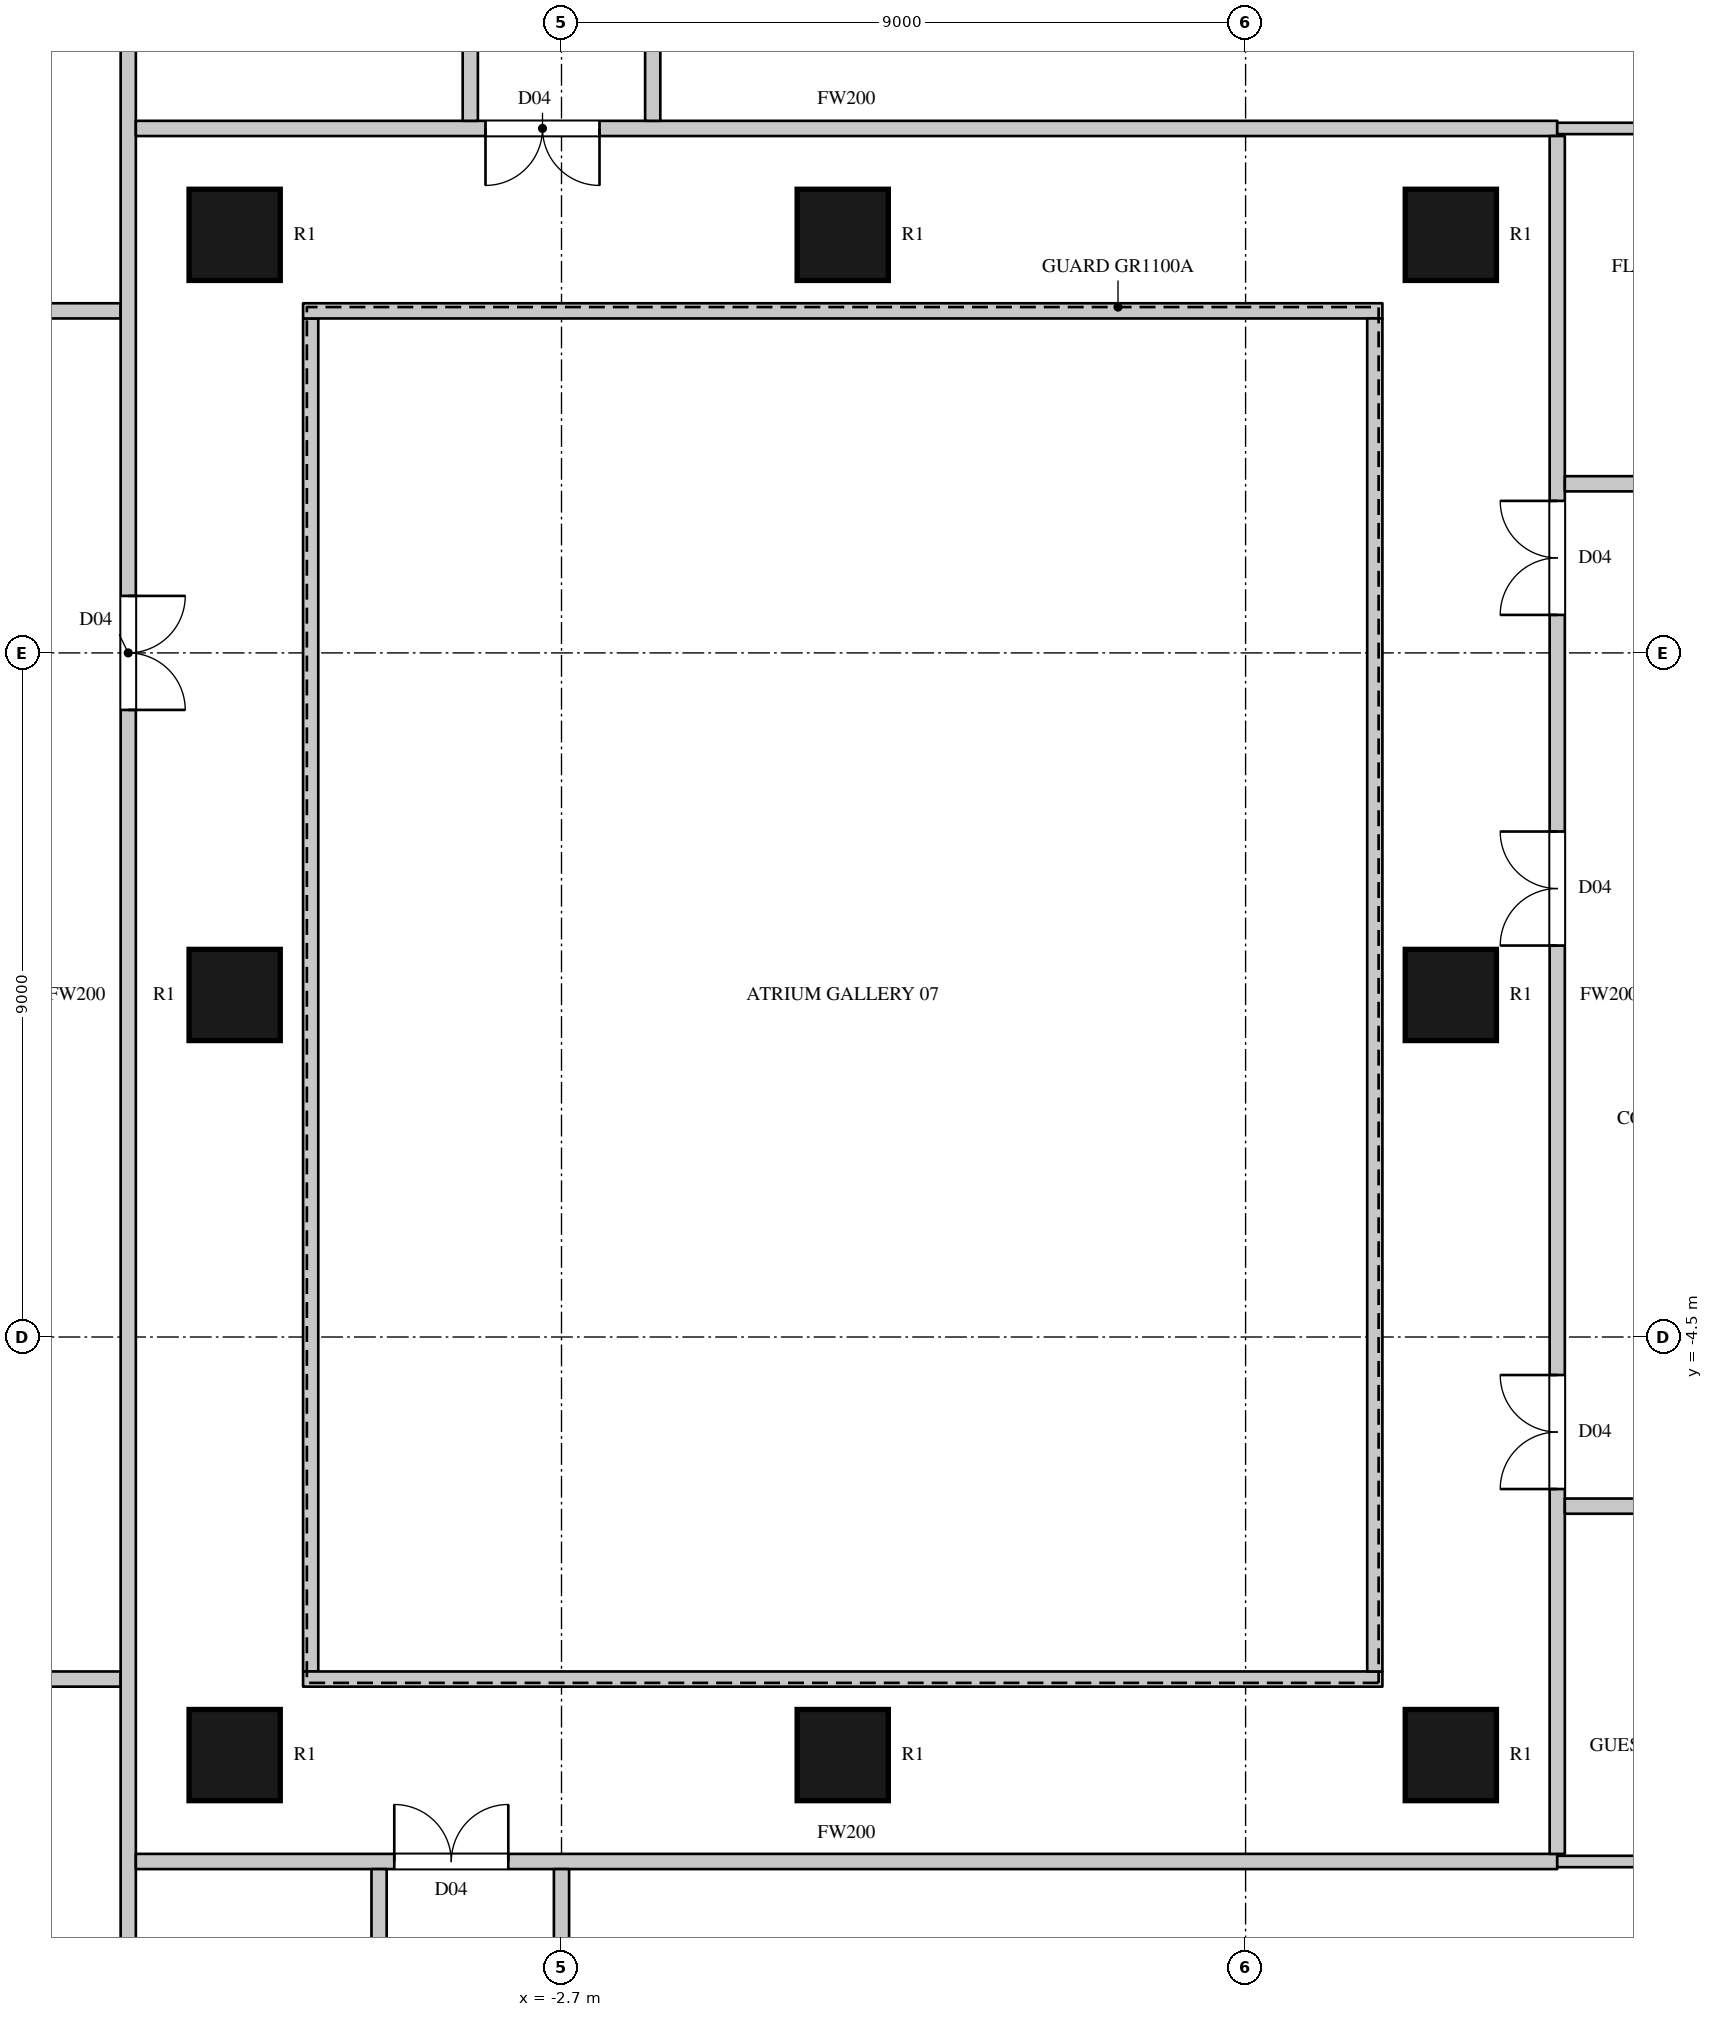
"""IFC4 building model, lengths in metres.
Left out: names, types, materials, properties, quantities, classifications, styles, units other than length and angle.
Written with IfcOpenShell. Run it as: python <this file> out.ifc"""

import sys

from ifc_helpers import new_model, si_unit, direction, frame, frame_2d, origin, origin_2d, place, context, subcontext, project, spatial, rectangle, circle, extrude, element, fill, save


model = new_model("IFC4")
c1 = context("Model", 3, precision=1e-05, world=origin(), true_north=direction((0.0, 1.0)))
c2 = subcontext(c1, "Body", "Model", "MODEL_VIEW")
j1 = project(units=[si_unit("LENGTHUNIT", "METRE"), si_unit("PLANEANGLEUNIT", "RADIAN")], contexts=[c1])
p1 = place(None, origin())
s1 = spatial("IfcSite", under=j1, at=p1, CompositionType="ELEMENT")
p2 = place(p1, origin())
s2 = spatial("IfcBuilding", under=s1, at=p2, CompositionType="ELEMENT")
p3 = place(p2, frame((0.0, 0.0, 55.5)))
s3 = spatial("IfcBuildingStorey", under=s2, at=p3, CompositionType="ELEMENT", Elevation=55.5)
for number, where, z_axis, x_axis in (
    (1, (-7.0, -10.0, 0.0), (0.0, 0.0, 1.0), (1.0, 0.0, 0.0)),
    (2, (-7.0, 0.0, 0.0), (0.0, 0.0, 1.0), (1.0, 0.0, 0.0)),
    (3, (-7.0, 10.0, 0.0), (0.0, 0.0, 1.0), (1.0, 0.0, 0.0)),
    (4, (1.0, -10.0, 0.0), (0.0, 0.0, 1.0), (1.0, 0.0, 0.0)),
    (5, (1.0, 10.0, 0.0), (0.0, 0.0, 1.0), (1.0, 0.0, 0.0)),
    (6, (9.0, -10.0, 0.0), (0.0, 0.0, 1.0), (1.0, 0.0, 0.0)),
    (7, (9.0, 0.0, 0.0), (0.0, 0.0, 1.0), (1.0, 0.0, 0.0)),
    (8, (9.0, 10.0, 0.0), (0.0, 0.0, 1.0), (1.0, 0.0, 0.0)),
):
    element("IfcColumn", number, at=place(p3, frame(where, z_axis=z_axis, x_axis=x_axis)), inside=s3, PredefinedType="COLUMN", context=c2, shape_type="SweptSolid", body=[
        extrude(circle(Radius=0.6, at=origin_2d()), origin(), (0.0, 0.0, 1.0), 3.6),
    ])
p4 = place(p3, frame((-13.97, -9.0, 0.0), z_axis=(0.0, 0.0, 1.0), x_axis=(1.0, 0.0, 0.0)))
e9 = element("IfcWall", 9, at=p4, inside=s3, PredefinedType="PARTITIONING", context=c2, shape_type="SweptSolid", body=[
    extrude(rectangle(XDim=5.47, YDim=0.2, at=frame_2d((2.735, 0.0))), origin(), (0.0, 0.0, 1.0), 3.3),
])
p5 = place(p4, frame((0.4, 0.0, 0.0)))
e10 = element("IfcOpeningElement", 10, at=p5, cuts=e9, PredefinedType="OPENING", context=c2, shape_type="SweptSolid", body=[
    extrude(rectangle(XDim=1.5, YDim=2.2, at=frame_2d((0.75, 1.1))), frame((0.0, 0.11, 0.0), z_axis=(0.0, -1.0, 0.0), x_axis=(1.0, 0.0, 0.0)), (0.0, 0.0, 1.0), 0.22),
])
p6 = place(p4, frame((2.05, 0.0, 0.0)))
e11 = element("IfcOpeningElement", 11, at=p6, cuts=e9, PredefinedType="OPENING", context=c2, shape_type="SweptSolid", body=[
    extrude(rectangle(XDim=1.5, YDim=2.2, at=frame_2d((0.75, 1.1))), frame((0.0, 0.11, 0.0), z_axis=(0.0, -1.0, 0.0), x_axis=(1.0, 0.0, 0.0)), (0.0, 0.0, 1.0), 0.22),
])
p7 = place(p3, frame((-13.97, 9.0, 0.0), z_axis=(0.0, 0.0, 1.0), x_axis=(1.0, 0.0, 0.0)))
e12 = element("IfcWall", 12, at=p7, inside=s3, PredefinedType="PARTITIONING", context=c2, shape_type="SweptSolid", body=[
    extrude(rectangle(XDim=5.47, YDim=0.2, at=frame_2d((2.735, 0.0))), origin(), (0.0, 0.0, 1.0), 3.3),
])
p8 = place(p3, frame((-8.4, -15.3, 0.0), z_axis=(0.0, 0.0, 1.0), x_axis=(0.0, 1.0, 0.0)))
e13 = element("IfcWall", 13, at=p8, inside=s3, PredefinedType="PARTITIONING", context=c2, shape_type="SweptSolid", body=[
    extrude(rectangle(XDim=30.6, YDim=0.2, at=frame_2d((15.3, 0.0))), origin(), (0.0, 0.0, 1.0), 3.3),
])
p9 = place(p8, frame((19.05, 0.0, 0.0)))
e14 = element("IfcOpeningElement", 14, at=p9, cuts=e13, PredefinedType="OPENING", context=c2, shape_type="SweptSolid", body=[
    extrude(rectangle(XDim=1.5, YDim=2.2, at=frame_2d((0.75, 1.1))), frame((0.0, 0.11, 0.0), z_axis=(0.0, -1.0, 0.0), x_axis=(1.0, 0.0, 0.0)), (0.0, 0.0, 1.0), 0.22),
])
p10 = place(p8, frame((29.55, 0.0, 0.0)))
e15 = element("IfcOpeningElement", 15, at=p10, cuts=e13, PredefinedType="OPENING", context=c2, shape_type="SweptSolid", body=[
    extrude(rectangle(XDim=0.9, YDim=2.2, at=frame_2d((0.45, 1.1))), frame((0.0, 0.11, 0.0), z_axis=(0.0, -1.0, 0.0), x_axis=(1.0, 0.0, 0.0)), (0.0, 0.0, 1.0), 0.22),
])
p11 = place(p8, frame((0.15, 0.0, 0.0)))
e16 = element("IfcOpeningElement", 16, at=p11, cuts=e13, PredefinedType="OPENING", context=c2, shape_type="SweptSolid", body=[
    extrude(rectangle(XDim=0.9, YDim=2.2, at=frame_2d((0.45, 1.1))), frame((0.0, 0.11, 0.0), z_axis=(0.0, -1.0, 0.0), x_axis=(1.0, 0.0, 0.0)), (0.0, 0.0, 1.0), 0.22),
])
p12 = place(p3, frame((-8.3, -11.4, 0.0), z_axis=(0.0, 0.0, 1.0), x_axis=(1.0, 0.0, 0.0)))
e17 = element("IfcWall", 17, at=p12, inside=s3, PredefinedType="PARTITIONING", context=c2, shape_type="SweptSolid", body=[
    extrude(rectangle(XDim=18.7, YDim=0.2, at=frame_2d((9.35, 0.0))), origin(), (0.0, 0.0, 1.0), 3.3),
])
p13 = place(p12, frame((3.4, 0.0, 0.0)))
e18 = element("IfcOpeningElement", 18, at=p13, cuts=e17, PredefinedType="OPENING", context=c2, shape_type="SweptSolid", body=[
    extrude(rectangle(XDim=1.5, YDim=2.2, at=frame_2d((0.75, 1.1))), frame((0.0, 0.11, 0.0), z_axis=(0.0, -1.0, 0.0), x_axis=(1.0, 0.0, 0.0)), (0.0, 0.0, 1.0), 0.22),
])
p14 = place(p3, frame((-8.3, 11.4, 0.0), z_axis=(0.0, 0.0, 1.0), x_axis=(1.0, 0.0, 0.0)))
e19 = element("IfcWall", 19, at=p14, inside=s3, PredefinedType="PARTITIONING", context=c2, shape_type="SweptSolid", body=[
    extrude(rectangle(XDim=18.7, YDim=0.2, at=frame_2d((9.35, 0.0))), origin(), (0.0, 0.0, 1.0), 3.3),
])
p15 = place(p14, frame((4.6, 0.0, 0.0)))
e20 = element("IfcOpeningElement", 20, at=p15, cuts=e19, PredefinedType="OPENING", context=c2, shape_type="SweptSolid", body=[
    extrude(rectangle(XDim=1.5, YDim=2.2, at=frame_2d((0.75, 1.1))), frame((0.0, 0.11, 0.0), z_axis=(0.0, -1.0, 0.0), x_axis=(1.0, 0.0, 0.0)), (0.0, 0.0, 1.0), 0.22),
])
p16 = place(p3, frame((-6.0, -8.9, 0.0), z_axis=(0.0, 0.0, 1.0), x_axis=(0.0, 1.0, 0.0)))
e21 = element("IfcWall", 21, at=p16, inside=s3, PredefinedType="PARTITIONING", context=c2, shape_type="SweptSolid", body=[
    extrude(rectangle(XDim=17.8, YDim=0.2, at=frame_2d((8.9, 0.0))), origin(), (0.0, 0.0, 1.0), 3.3),
])
for number, where, z_axis, x_axis in (
    (22, (-6.1, -9.0, 0.0), (0.0, 0.0, 1.0), (1.0, 0.0, 0.0)),
    (23, (-6.1, 9.0, 0.0), (0.0, 0.0, 1.0), (1.0, 0.0, 0.0)),
):
    element("IfcWall", number, at=place(p3, frame(where, z_axis=z_axis, x_axis=x_axis)), inside=s3, PredefinedType="PARTITIONING", context=c2, shape_type="SweptSolid", body=[
        extrude(rectangle(XDim=14.2, YDim=0.2, at=frame_2d((7.1, 0.0))), origin(), (0.0, 0.0, 1.0), 3.3),
    ])
for number, where, z_axis, x_axis in (
    (24, (-5.1, -15.3, 0.0), (0.0, 0.0, 1.0), (0.0, 1.0, 0.0)),
    (25, (-3.9, 11.5, 0.0), (0.0, 0.0, 1.0), (0.0, 1.0, 0.0)),
):
    element("IfcWall", number, at=place(p3, frame(where, z_axis=z_axis, x_axis=x_axis)), inside=s3, PredefinedType="PARTITIONING", context=c2, shape_type="SweptSolid", body=[
        extrude(rectangle(XDim=3.8, YDim=0.2, at=frame_2d((1.9, 0.0))), origin(), (0.0, 0.0, 1.0), 3.3),
    ])
p17 = place(p3, frame((-2.7, -15.3, 0.0), z_axis=(0.0, 0.0, 1.0), x_axis=(0.0, 1.0, 0.0)))
e26 = element("IfcWall", 26, at=p17, inside=s3, PredefinedType="PARTITIONING", context=c2, shape_type="SweptSolid", body=[
    extrude(rectangle(XDim=3.8, YDim=0.2, at=frame_2d((1.9, 0.0))), origin(), (0.0, 0.0, 1.0), 2.75),
])
p18 = place(p17, frame((0.15, 0.0, 0.0)))
e27 = element("IfcOpeningElement", 27, at=p18, cuts=e26, PredefinedType="OPENING", context=c2, shape_type="SweptSolid", body=[
    extrude(rectangle(XDim=0.9, YDim=2.2, at=frame_2d((0.45, 1.1))), frame((0.0, 0.11, 0.0), z_axis=(0.0, -1.0, 0.0), x_axis=(1.0, 0.0, 0.0)), (0.0, 0.0, 1.0), 0.22),
])
p19 = place(p3, frame((-1.5, 11.5, 0.0), z_axis=(0.0, 0.0, 1.0), x_axis=(0.0, 1.0, 0.0)))
e28 = element("IfcWall", 28, at=p19, inside=s3, PredefinedType="PARTITIONING", context=c2, shape_type="SweptSolid", body=[
    extrude(rectangle(XDim=3.8, YDim=0.2, at=frame_2d((1.9, 0.0))), origin(), (0.0, 0.0, 1.0), 3.3),
])
p20 = place(p19, frame((2.75, 0.0, 0.0)))
e29 = element("IfcOpeningElement", 29, at=p20, cuts=e28, PredefinedType="OPENING", context=c2, shape_type="SweptSolid", body=[
    extrude(rectangle(XDim=0.9, YDim=2.2, at=frame_2d((0.45, 1.1))), frame((0.0, 0.11, 0.0), z_axis=(0.0, -1.0, 0.0), x_axis=(1.0, 0.0, 0.0)), (0.0, 0.0, 1.0), 0.22),
])
p21 = place(p3, frame((8.0, -8.9, 0.0), z_axis=(0.0, 0.0, 1.0), x_axis=(0.0, 1.0, 0.0)))
e30 = element("IfcWall", 30, at=p21, inside=s3, PredefinedType="PARTITIONING", context=c2, shape_type="SweptSolid", body=[
    extrude(rectangle(XDim=17.8, YDim=0.2, at=frame_2d((8.9, 0.0))), origin(), (0.0, 0.0, 1.0), 3.3),
])
p22 = place(p3, frame((10.4, -11.3, 0.0), z_axis=(0.0, 0.0, 1.0), x_axis=(0.0, 1.0, 0.0)))
e31 = element("IfcWall", 31, at=p22, inside=s3, PredefinedType="PARTITIONING", context=c2, shape_type="SweptSolid", body=[
    extrude(rectangle(XDim=22.6, YDim=0.2, at=frame_2d((11.3, 0.0))), origin(), (0.0, 0.0, 1.0), 3.3),
])
p23 = place(p22, frame((4.8, 0.0, 0.0)))
e32 = element("IfcOpeningElement", 32, at=p23, cuts=e31, PredefinedType="OPENING", context=c2, shape_type="SweptSolid", body=[
    extrude(rectangle(XDim=1.5, YDim=2.2, at=frame_2d((0.75, 1.1))), frame((0.0, 0.11, 0.0), z_axis=(0.0, -1.0, 0.0), x_axis=(1.0, 0.0, 0.0)), (0.0, 0.0, 1.0), 0.22),
])
p24 = place(p22, frame((16.3, 0.0, 0.0)))
e33 = element("IfcOpeningElement", 33, at=p24, cuts=e31, PredefinedType="OPENING", context=c2, shape_type="SweptSolid", body=[
    extrude(rectangle(XDim=1.5, YDim=2.2, at=frame_2d((0.75, 1.1))), frame((0.0, 0.11, 0.0), z_axis=(0.0, -1.0, 0.0), x_axis=(1.0, 0.0, 0.0)), (0.0, 0.0, 1.0), 0.22),
])
p25 = place(p22, frame((11.95, 0.0, 0.0)))
e34 = element("IfcOpeningElement", 34, at=p25, cuts=e31, PredefinedType="OPENING", context=c2, shape_type="SweptSolid", body=[
    extrude(rectangle(XDim=1.5, YDim=2.2, at=frame_2d((0.75, 1.1))), frame((0.0, 0.11, 0.0), z_axis=(0.0, -1.0, 0.0), x_axis=(1.0, 0.0, 0.0)), (0.0, 0.0, 1.0), 0.22),
])
p26 = place(p3, frame((10.5, -6.725, 0.0), z_axis=(0.0, 0.0, 1.0), x_axis=(1.0, 0.0, 0.0)))
e35 = element("IfcWall", 35, at=p26, inside=s3, PredefinedType="PARTITIONING", context=c2, shape_type="SweptSolid", body=[
    extrude(rectangle(XDim=3.6, YDim=0.2, at=frame_2d((1.8, 0.0))), origin(), (0.0, 0.0, 1.0), 3.3),
])
p27 = place(p26, frame((1.65, 0.0, 0.0)))
e36 = element("IfcOpeningElement", 36, at=p27, cuts=e35, PredefinedType="OPENING", context=c2, shape_type="SweptSolid", body=[
    extrude(rectangle(XDim=1.6, YDim=2.4, at=frame_2d((0.8, 1.2))), frame((0.0, 0.11, 0.0), z_axis=(0.0, -1.0, 0.0), x_axis=(1.0, 0.0, 0.0)), (0.0, 0.0, 1.0), 0.22),
])
p28 = place(p3, frame((10.5, 6.725, 0.0), z_axis=(0.0, 0.0, 1.0), x_axis=(1.0, 0.0, 0.0)))
e37 = element("IfcWall", 37, at=p28, inside=s3, PredefinedType="PARTITIONING", context=c2, shape_type="SweptSolid", body=[
    extrude(rectangle(XDim=3.6, YDim=0.2, at=frame_2d((1.8, 0.0))), origin(), (0.0, 0.0, 1.0), 3.3),
])
p29 = place(p28, frame((2.3, 0.0, 0.0)))
e38 = element("IfcOpeningElement", 38, at=p29, cuts=e37, PredefinedType="OPENING", context=c2, shape_type="SweptSolid", body=[
    extrude(rectangle(XDim=0.95, YDim=2.2, at=frame_2d((0.475, 1.1))), frame((0.0, 0.11, 0.0), z_axis=(0.0, -1.0, 0.0), x_axis=(1.0, 0.0, 0.0)), (0.0, 0.0, 1.0), 0.22),
])
for number, where, z_axis, x_axis in (
    (39, (10.4, -11.4, 0.0), (0.0, 0.0, 1.0), (1.0, 0.0, 0.0)),
    (40, (10.4, 11.4, 0.0), (0.0, 0.0, 1.0), (1.0, 0.0, 0.0)),
):
    element("IfcWall", number, at=place(p3, frame(where, z_axis=z_axis, x_axis=x_axis)), inside=s3, PredefinedType="PARTITIONING", context=c2, shape_type="SweptSolid", body=[
        extrude(rectangle(XDim=3.5, YDim=0.15, at=frame_2d((1.75, 0.0))), origin(), (0.0, 0.0, 1.0), 3.3),
    ])
p30 = place(p9, origin())
e41 = element("IfcDoor", 41, at=p30, inside=s3, OperationType="DOUBLE_DOOR_SINGLE_SWING", PredefinedType="DOOR", context=c2, shape_type="SweptSolid", body=[
    extrude(rectangle(XDim=1.5, YDim=2.2, at=frame_2d((0.75, 1.1))), frame((0.0, 0.025, 0.0), z_axis=(0.0, -1.0, 0.0), x_axis=(1.0, 0.0, 0.0)), (0.0, 0.0, 1.0), 0.05),
])
fill(e14, e41)
p31 = place(p13, origin())
e42 = element("IfcDoor", 42, at=p31, inside=s3, OperationType="DOUBLE_DOOR_SINGLE_SWING", PredefinedType="DOOR", context=c2, shape_type="SweptSolid", body=[
    extrude(rectangle(XDim=1.5, YDim=2.2, at=frame_2d((0.75, 1.1))), frame((0.0, 0.025, 0.0), z_axis=(0.0, -1.0, 0.0), x_axis=(1.0, 0.0, 0.0)), (0.0, 0.0, 1.0), 0.05),
])
fill(e18, e42)
p32 = place(p15, origin())
e43 = element("IfcDoor", 43, at=p32, inside=s3, OperationType="DOUBLE_DOOR_SINGLE_SWING", PredefinedType="DOOR", context=c2, shape_type="SweptSolid", body=[
    extrude(rectangle(XDim=1.5, YDim=2.2, at=frame_2d((0.75, 1.1))), frame((0.0, 0.025, 0.0), z_axis=(0.0, -1.0, 0.0), x_axis=(1.0, 0.0, 0.0)), (0.0, 0.0, 1.0), 0.05),
])
fill(e20, e43)
p33 = place(p23, origin())
e44 = element("IfcDoor", 44, at=p33, inside=s3, OperationType="DOUBLE_DOOR_SINGLE_SWING", PredefinedType="DOOR", context=c2, shape_type="SweptSolid", body=[
    extrude(rectangle(XDim=1.5, YDim=2.2, at=frame_2d((0.75, 1.1))), frame((0.0, 0.025, 0.0), z_axis=(0.0, -1.0, 0.0), x_axis=(1.0, 0.0, 0.0)), (0.0, 0.0, 1.0), 0.05),
])
fill(e32, e44)
p34 = place(p24, origin())
e45 = element("IfcDoor", 45, at=p34, inside=s3, OperationType="DOUBLE_DOOR_SINGLE_SWING", PredefinedType="DOOR", context=c2, shape_type="SweptSolid", body=[
    extrude(rectangle(XDim=1.5, YDim=2.2, at=frame_2d((0.75, 1.1))), frame((0.0, 0.025, 0.0), z_axis=(0.0, -1.0, 0.0), x_axis=(1.0, 0.0, 0.0)), (0.0, 0.0, 1.0), 0.05),
])
fill(e33, e45)
p35 = place(p25, origin())
e46 = element("IfcDoor", 46, at=p35, inside=s3, OperationType="DOUBLE_DOOR_SINGLE_SWING", PredefinedType="DOOR", context=c2, shape_type="SweptSolid", body=[
    extrude(rectangle(XDim=1.5, YDim=2.2, at=frame_2d((0.75, 1.1))), frame((0.0, 0.025, 0.0), z_axis=(0.0, -1.0, 0.0), x_axis=(1.0, 0.0, 0.0)), (0.0, 0.0, 1.0), 0.05),
])
fill(e34, e46)
save(model, sys.argv[1])
